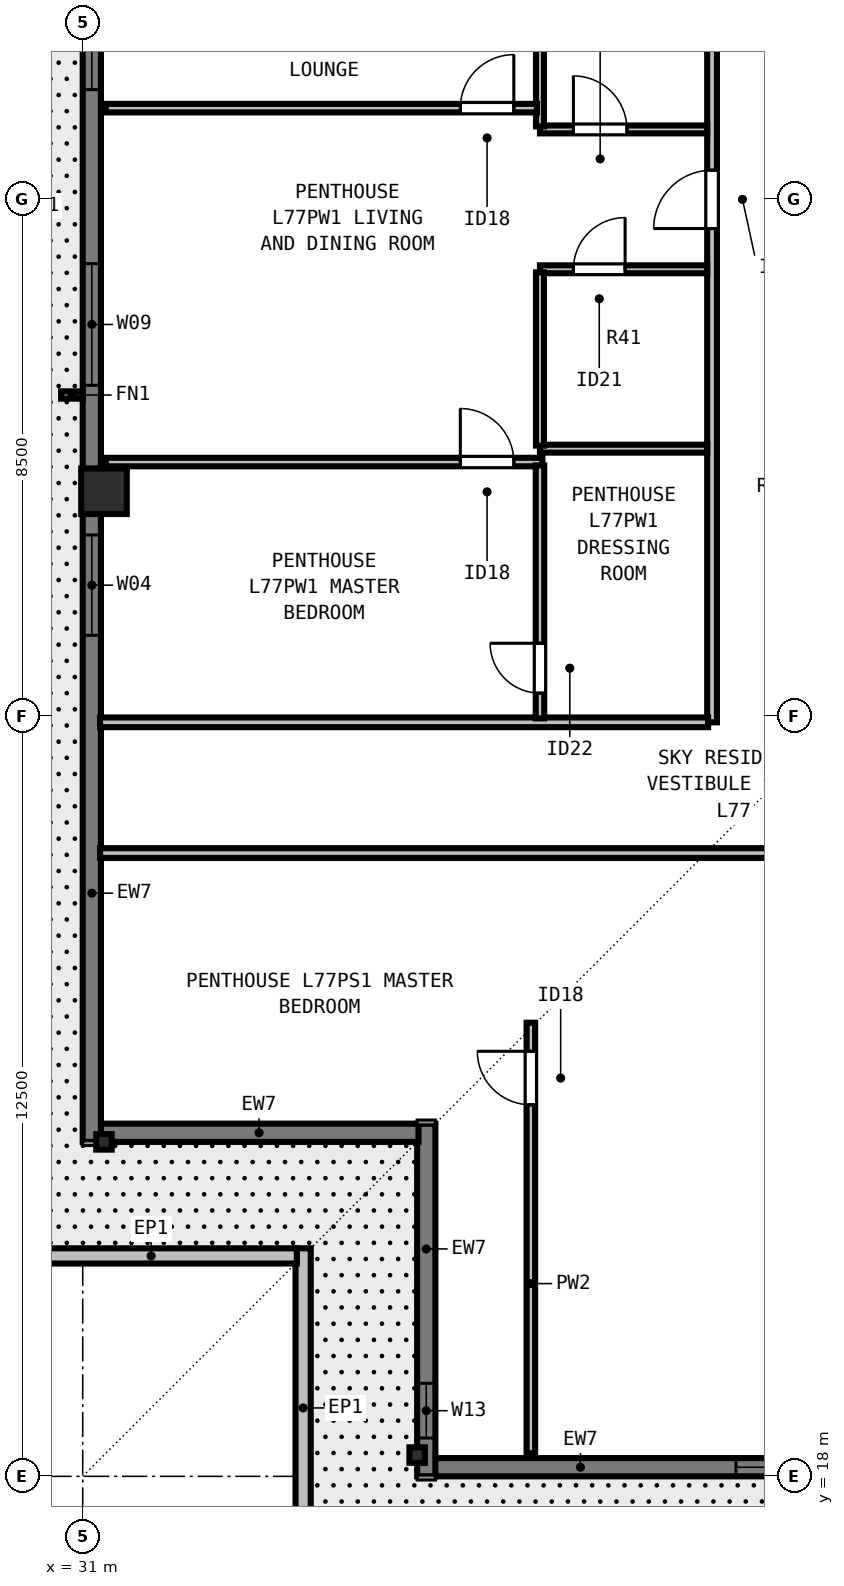
"""IFC4 building model, lengths in metres.
Left out: names, types, materials, properties, quantities, classifications, styles, units other than length and angle.
Written with IfcOpenShell. Run it as: python <this file> out.ifc"""

import sys

from ifc_helpers import new_model, si_unit, direction, frame, frame_2d, origin, origin_2d, place, context, subcontext, project, spatial, rectangle, i_section, extrude, element, fill, save


model = new_model("IFC4")
c1 = context("Model", 3, precision=1e-05, world=origin(), true_north=direction((0.0, 1.0)))
c2 = subcontext(c1, "Body", "Model", "MODEL_VIEW")
j1 = project(units=[si_unit("LENGTHUNIT", "METRE"), si_unit("PLANEANGLEUNIT", "RADIAN")], contexts=[c1])
p1 = place(None, origin())
s1 = spatial("IfcSite", under=j1, at=p1, CompositionType="ELEMENT")
p2 = place(p1, origin())
s2 = spatial("IfcBuilding", under=s1, at=p2, CompositionType="ELEMENT")
p3 = place(p2, frame((0.0, 0.0, 280.5)))
s3 = spatial("IfcBuildingStorey", under=s2, at=p3, CompositionType="ELEMENT", Elevation=280.5)
p4 = place(p3, frame((36.5, 18.35, 0.0), z_axis=(0.0, 0.0, 1.0), x_axis=(1.0, 0.0, 0.0)))
e1 = element("IfcColumn", 1, at=p4, inside=s3, PredefinedType="COLUMN", context=c2, shape_type="SweptSolid", body=[
    extrude(i_section(OverallWidth=0.254, OverallDepth=0.254, WebThickness=0.009, FlangeThickness=0.014, FilletRadius=0.013, at=origin_2d()), origin(), (0.0, 0.0, 1.0), 3.5),
])
p5 = place(p3, frame((31.35, 34.2, 0.0), z_axis=(0.0, 0.0, 1.0), x_axis=(0.0, 1.0, 0.0)))
e2 = element("IfcColumn", 2, at=p5, inside=s3, PredefinedType="COLUMN", context=c2, shape_type="SweptSolid", body=[
    extrude(rectangle(XDim=0.75, YDim=0.75, at=origin_2d()), origin(), (0.0, 0.0, 1.0), 3.5),
])
p6 = place(p3, frame((31.35, 23.5, 0.0), z_axis=(0.0, 0.0, 1.0), x_axis=(0.0, 1.0, 0.0)))
e3 = element("IfcColumn", 3, at=p6, inside=s3, PredefinedType="COLUMN", context=c2, shape_type="SweptSolid", body=[
    extrude(i_section(OverallWidth=0.254, OverallDepth=0.254, WebThickness=0.009, FlangeThickness=0.014, FilletRadius=0.013, at=origin_2d()), origin(), (0.0, 0.0, 1.0), 3.5),
])
p7 = place(p3, frame((34.625, 16.5, 0.0), z_axis=(0.0, 0.0, 1.0), x_axis=(0.0, 1.0, 0.0)))
e4 = element("IfcWall", 4, at=p7, inside=s3, PredefinedType="PARAPET", context=c2, shape_type="SweptSolid", body=[
    extrude(rectangle(XDim=5.25, YDim=0.25, at=frame_2d((2.625, 0.0))), origin(), (0.0, 0.0, 1.0), 1.15),
])
p8 = place(p3, frame((34.522, 21.625, 0.0), z_axis=(0.0, 0.0, 1.0), x_axis=(-1.0, 0.0, 0.0)))
e5 = element("IfcWall", 5, at=p8, inside=s3, PredefinedType="PARAPET", context=c2, shape_type="SweptSolid", body=[
    extrude(rectangle(XDim=4.794, YDim=0.25, at=frame_2d((2.397, 0.0))), origin(), (0.0, 0.0, 1.0), 1.15),
])
p9 = place(p3, frame((57.4, 18.15, 0.0), z_axis=(0.0, 0.0, 1.0), x_axis=(-1.0, 0.0, 0.0)))
e6 = element("IfcWall", 6, at=p9, inside=s3, PredefinedType="SOLIDWALL", context=c2, shape_type="SweptSolid", body=[
    extrude(rectangle(XDim=20.622, YDim=0.3, at=frame_2d((10.311, 0.0))), origin(), (0.0, 0.0, 1.0), 3.29),
])
p10 = place(p9, frame((1.34, 0.0, 0.8)))
e7 = element("IfcOpeningElement", 7, at=p10, cuts=e6, PredefinedType="OPENING", context=c2, shape_type="SweptSolid", body=[
    extrude(rectangle(XDim=2.0, YDim=1.758, at=frame_2d((1.0, 0.879))), frame((0.0, 0.16, 0.0), z_axis=(0.0, -1.0, 0.0), x_axis=(1.0, 0.0, 0.0)), (0.0, 0.0, 1.0), 0.32),
])
p11 = place(p9, frame((6.246, 0.0, 0.8)))
e8 = element("IfcOpeningElement", 8, at=p11, cuts=e6, PredefinedType="OPENING", context=c2, shape_type="SweptSolid", body=[
    extrude(rectangle(XDim=1.65, YDim=1.758, at=frame_2d((0.825, 0.879))), frame((0.0, 0.16, 0.0), z_axis=(0.0, -1.0, 0.0), x_axis=(1.0, 0.0, 0.0)), (0.0, 0.0, 1.0), 0.32),
])
p12 = place(p9, frame((10.801, 0.0, 0.8)))
e9 = element("IfcOpeningElement", 9, at=p12, cuts=e6, PredefinedType="OPENING", context=c2, shape_type="SweptSolid", body=[
    extrude(rectangle(XDim=2.0, YDim=1.758, at=frame_2d((1.0, 0.879))), frame((0.0, 0.16, 0.0), z_axis=(0.0, -1.0, 0.0), x_axis=(1.0, 0.0, 0.0)), (0.0, 0.0, 1.0), 0.32),
])
p13 = place(p9, frame((14.007, 0.0, 0.8)))
e10 = element("IfcOpeningElement", 10, at=p13, cuts=e6, PredefinedType="OPENING", context=c2, shape_type="SweptSolid", body=[
    extrude(rectangle(XDim=1.65, YDim=1.758, at=frame_2d((0.825, 0.879))), frame((0.0, 0.16, 0.0), z_axis=(0.0, -1.0, 0.0), x_axis=(1.0, 0.0, 0.0)), (0.0, 0.0, 1.0), 0.32),
])
p14 = place(p9, frame((4.7, 0.0, 0.0)))
e11 = element("IfcOpeningElement", 11, at=p14, cuts=e6, PredefinedType="OPENING", context=c2, shape_type="SweptSolid", body=[
    extrude(rectangle(XDim=1.15, YDim=2.15, at=frame_2d((0.575, 1.075))), frame((0.0, 0.16, 0.0), z_axis=(0.0, -1.0, 0.0), x_axis=(1.0, 0.0, 0.0)), (0.0, 0.0, 1.0), 0.32),
])
p15 = place(p3, frame((36.65, 18.0, 0.0), z_axis=(0.0, 0.0, 1.0), x_axis=(0.0, 1.0, 0.0)))
e12 = element("IfcWall", 12, at=p15, inside=s3, PredefinedType="SOLIDWALL", context=c2, shape_type="SweptSolid", body=[
    extrude(rectangle(XDim=5.8, YDim=0.3, at=frame_2d((2.9, 0.0))), origin(), (0.0, 0.0, 1.0), 3.29),
])
p16 = place(p15, frame((0.63, 0.0, 0.8)))
e13 = element("IfcOpeningElement", 13, at=p16, cuts=e12, PredefinedType="OPENING", context=c2, shape_type="SweptSolid", body=[
    extrude(rectangle(XDim=0.9, YDim=1.75, at=frame_2d((0.45, 0.875))), frame((0.0, 0.16, 0.0), z_axis=(0.0, -1.0, 0.0), x_axis=(1.0, 0.0, 0.0)), (0.0, 0.0, 1.0), 0.32),
])
p17 = place(p3, frame((36.522, 23.65, 0.0), z_axis=(0.0, 0.0, 1.0), x_axis=(-1.0, 0.0, 0.0)))
e14 = element("IfcWall", 14, at=p17, inside=s3, PredefinedType="SOLIDWALL", context=c2, shape_type="SweptSolid", body=[
    extrude(rectangle(XDim=5.244, YDim=0.3, at=frame_2d((2.622, 0.0))), origin(), (0.0, 0.0, 1.0), 3.29),
])
p18 = place(p3, frame((31.15, 23.5, 0.0), z_axis=(0.0, 0.0, 1.0), x_axis=(0.0, 1.0, 0.0)))
e15 = element("IfcWall", 15, at=p18, inside=s3, PredefinedType="SOLIDWALL", context=c2, shape_type="SweptSolid", body=[
    extrude(rectangle(XDim=30.722, YDim=0.3, at=frame_2d((15.361, 0.0))), origin(), (0.0, 0.0, 1.0), 3.29),
])
p19 = place(p18, frame((8.331, 0.0, 0.8)))
e16 = element("IfcOpeningElement", 16, at=p19, cuts=e15, PredefinedType="OPENING", context=c2, shape_type="SweptSolid", body=[
    extrude(rectangle(XDim=1.65, YDim=1.758, at=frame_2d((0.825, 0.879))), frame((0.0, 0.16, 0.0), z_axis=(0.0, -1.0, 0.0), x_axis=(1.0, 0.0, 0.0)), (0.0, 0.0, 1.0), 0.32),
])
p20 = place(p18, frame((12.442, 0.0, 0.8)))
e17 = element("IfcOpeningElement", 17, at=p20, cuts=e15, PredefinedType="OPENING", context=c2, shape_type="SweptSolid", body=[
    extrude(rectangle(XDim=2.0, YDim=1.758, at=frame_2d((1.0, 0.879))), frame((0.0, 0.16, 0.0), z_axis=(0.0, -1.0, 0.0), x_axis=(1.0, 0.0, 0.0)), (0.0, 0.0, 1.0), 0.32),
])
p21 = place(p18, frame((17.304, 0.0, 0.8)))
e18 = element("IfcOpeningElement", 18, at=p21, cuts=e15, PredefinedType="OPENING", context=c2, shape_type="SweptSolid", body=[
    extrude(rectangle(XDim=1.65, YDim=1.758, at=frame_2d((0.825, 0.879))), frame((0.0, 0.16, 0.0), z_axis=(0.0, -1.0, 0.0), x_axis=(1.0, 0.0, 0.0)), (0.0, 0.0, 1.0), 0.32),
])
p22 = place(p18, frame((20.967, 0.0, 0.8)))
e19 = element("IfcOpeningElement", 19, at=p22, cuts=e15, PredefinedType="OPENING", context=c2, shape_type="SweptSolid", body=[
    extrude(rectangle(XDim=2.0, YDim=1.758, at=frame_2d((1.0, 0.879))), frame((0.0, 0.16, 0.0), z_axis=(0.0, -1.0, 0.0), x_axis=(1.0, 0.0, 0.0)), (0.0, 0.0, 1.0), 0.32),
])
p23 = place(p18, frame((26.63, 0.0, 0.8)))
e20 = element("IfcOpeningElement", 20, at=p23, cuts=e15, PredefinedType="OPENING", context=c2, shape_type="SweptSolid", body=[
    extrude(rectangle(XDim=0.9, YDim=1.75, at=frame_2d((0.45, 0.875))), frame((0.0, 0.16, 0.0), z_axis=(0.0, -1.0, 0.0), x_axis=(1.0, 0.0, 0.0)), (0.0, 0.0, 1.0), 0.32),
])
p24 = place(p3, frame((31.285, 28.25, 0.0), z_axis=(0.0, 0.0, 1.0), x_axis=(1.0, 0.0, 0.0)))
e21 = element("IfcWall", 21, at=p24, inside=s3, PredefinedType="PARTITIONING", context=c2, shape_type="SweptSolid", body=[
    extrude(rectangle(XDim=41.43, YDim=0.16, at=frame_2d((20.715, 0.0))), origin(), (0.0, 0.0, 1.0), 3.009),
])
p25 = place(p24, frame((20.235, 0.0, 0.0)))
e22 = element("IfcOpeningElement", 22, at=p25, cuts=e21, PredefinedType="OPENING", context=c2, shape_type="SweptSolid", body=[
    extrude(rectangle(XDim=0.96, YDim=2.18, at=frame_2d((0.48, 1.09))), frame((0.0, 0.09, 0.0), z_axis=(0.0, -1.0, 0.0), x_axis=(1.0, 0.0, 0.0)), (0.0, 0.0, 1.0), 0.18),
])
p26 = place(p3, frame((41.35, 30.4, 0.0), z_axis=(0.0, 0.0, 1.0), x_axis=(0.0, 1.0, 0.0)))
e23 = element("IfcWall", 23, at=p26, inside=s3, PredefinedType="PARTITIONING", context=c2, shape_type="SweptSolid", body=[
    extrude(rectangle(XDim=17.2, YDim=0.16, at=frame_2d((8.6, 0.0))), origin(), (0.0, 0.0, 1.0), 3.009),
])
p27 = place(p26, frame((8.12, 0.0, 0.0)))
e24 = element("IfcOpeningElement", 24, at=p27, cuts=e23, PredefinedType="OPENING", context=c2, shape_type="SweptSolid", body=[
    extrude(rectangle(XDim=0.96, YDim=2.18, at=frame_2d((0.48, 1.09))), frame((0.0, 0.09, 0.0), z_axis=(0.0, -1.0, 0.0), x_axis=(1.0, 0.0, 0.0)), (0.0, 0.0, 1.0), 0.18),
])
p28 = place(p3, frame((31.285, 30.4, 0.0), z_axis=(0.0, 0.0, 1.0), x_axis=(1.0, 0.0, 0.0)))
e25 = element("IfcWall", 25, at=p28, inside=s3, PredefinedType="PARTITIONING", context=c2, shape_type="SweptSolid", body=[
    extrude(rectangle(XDim=10.0, YDim=0.16, at=frame_2d((5.0, 0.0))), origin(), (0.0, 0.0, 1.0), 3.29),
])
p29 = place(p3, frame((38.37, 18.38, 0.0), z_axis=(0.0, 0.0, 1.0), x_axis=(0.0, 1.0, 0.0)))
e26 = element("IfcWall", 26, at=p29, inside=s3, PredefinedType="PARTITIONING", context=c2, shape_type="SweptSolid", body=[
    extrude(rectangle(XDim=7.08, YDim=0.14, at=frame_2d((3.54, 0.0))), origin(), (0.0, 0.0, 1.0), 2.653),
])
p30 = place(p29, frame((5.73, 0.0, 0.0)))
e27 = element("IfcOpeningElement", 27, at=p30, cuts=e26, PredefinedType="OPENING", context=c2, shape_type="SweptSolid", body=[
    extrude(rectangle(XDim=0.88, YDim=2.1, at=frame_2d((0.44, 1.05))), frame((0.0, 0.08, 0.0), z_axis=(0.0, -1.0, 0.0), x_axis=(1.0, 0.0, 0.0)), (0.0, 0.0, 1.0), 0.16),
])
p31 = place(p3, frame((38.52, 34.9, 0.0), z_axis=(0.0, 0.0, 1.0), x_axis=(1.0, 0.0, 0.0)))
e28 = element("IfcWall", 28, at=p31, inside=s3, PredefinedType="PLUMBINGWALL", context=c2, shape_type="SweptSolid", body=[
    extrude(rectangle(XDim=2.75, YDim=0.13, at=frame_2d((1.375, 0.0))), origin(), (0.0, 0.0, 1.0), 3.29),
])
p32 = place(p3, frame((38.52, 37.85, 0.0), z_axis=(0.0, 0.0, 1.0), x_axis=(1.0, 0.0, 0.0)))
e29 = element("IfcWall", 29, at=p32, inside=s3, PredefinedType="PLUMBINGWALL", context=c2, shape_type="SweptSolid", body=[
    extrude(rectangle(XDim=2.75, YDim=0.13, at=frame_2d((1.375, 0.0))), origin(), (0.0, 0.0, 1.0), 3.29),
])
p33 = place(p32, frame((0.55, 0.0, 0.0)))
e30 = element("IfcOpeningElement", 30, at=p33, cuts=e29, PredefinedType="OPENING", context=c2, shape_type="SweptSolid", body=[
    extrude(rectangle(XDim=0.85, YDim=2.08, at=frame_2d((0.425, 1.04))), frame((0.0, 0.075, 0.0), z_axis=(0.0, -1.0, 0.0), x_axis=(1.0, 0.0, 0.0)), (0.0, 0.0, 1.0), 0.15),
])
p34 = place(p3, frame((38.52, 34.95, 0.0), z_axis=(0.0, 0.0, 1.0), x_axis=(0.0, 1.0, 0.0)))
e31 = element("IfcWall", 31, at=p34, inside=s3, PredefinedType="PLUMBINGWALL", context=c2, shape_type="SweptSolid", body=[
    extrude(rectangle(XDim=2.85, YDim=0.13, at=frame_2d((1.425, 0.0))), origin(), (0.0, 0.0, 1.0), 3.29),
])
p35 = place(p3, frame((38.52, 40.15, 0.0), z_axis=(0.0, 0.0, 1.0), x_axis=(1.0, 0.0, 0.0)))
e32 = element("IfcWall", 32, at=p35, inside=s3, PredefinedType="PLUMBINGWALL", context=c2, shape_type="SweptSolid", body=[
    extrude(rectangle(XDim=2.75, YDim=0.13, at=frame_2d((1.375, 0.0))), origin(), (0.0, 0.0, 1.0), 3.29),
])
p36 = place(p35, frame((0.55, 0.0, 0.0)))
e33 = element("IfcOpeningElement", 33, at=p36, cuts=e32, PredefinedType="OPENING", context=c2, shape_type="SweptSolid", body=[
    extrude(rectangle(XDim=0.88, YDim=2.1, at=frame_2d((0.44, 1.05))), frame((0.0, 0.075, 0.0), z_axis=(0.0, -1.0, 0.0), x_axis=(1.0, 0.0, 0.0)), (0.0, 0.0, 1.0), 0.15),
])
p37 = place(p3, frame((38.52, 40.2, 0.0), z_axis=(0.0, 0.0, 1.0), x_axis=(0.0, 1.0, 0.0)))
e34 = element("IfcWall", 34, at=p37, inside=s3, PredefinedType="PLUMBINGWALL", context=c2, shape_type="SweptSolid", body=[
    extrude(rectangle(XDim=3.15, YDim=0.13, at=frame_2d((1.575, 0.0))), origin(), (0.0, 0.0, 1.0), 3.009),
])
p38 = place(p3, frame((31.38, 34.68, 0.0), z_axis=(0.0, 0.0, 1.0), x_axis=(1.0, 0.0, 0.0)))
e35 = element("IfcWall", 35, at=p38, inside=s3, PredefinedType="PARTITIONING", context=c2, shape_type="SweptSolid", body=[
    extrude(rectangle(XDim=7.18, YDim=0.14, at=frame_2d((3.59, 0.0))), origin(), (0.0, 0.0, 1.0), 3.29),
])
p39 = place(p38, frame((5.83, 0.0, 0.0)))
e36 = element("IfcOpeningElement", 36, at=p39, cuts=e35, PredefinedType="OPENING", context=c2, shape_type="SweptSolid", body=[
    extrude(rectangle(XDim=0.88, YDim=2.1, at=frame_2d((0.44, 1.05))), frame((0.0, 0.08, 0.0), z_axis=(0.0, -1.0, 0.0), x_axis=(1.0, 0.0, 0.0)), (0.0, 0.0, 1.0), 0.16),
])
p40 = place(p3, frame((38.52, 30.465, 0.0), z_axis=(0.0, 0.0, 1.0), x_axis=(0.0, 1.0, 0.0)))
e37 = element("IfcWall", 37, at=p40, inside=s3, PredefinedType="PARTITIONING", context=c2, shape_type="SweptSolid", body=[
    extrude(rectangle(XDim=4.16, YDim=0.14, at=frame_2d((2.08, 0.0))), origin(), (0.0, 0.0, 1.0), 3.29),
])
p41 = place(p40, frame((0.415, 0.0, 0.0)))
e38 = element("IfcOpeningElement", 38, at=p41, cuts=e37, PredefinedType="OPENING", context=c2, shape_type="SweptSolid", body=[
    extrude(rectangle(XDim=0.82, YDim=2.1, at=frame_2d((0.41, 1.05))), frame((0.0, 0.08, 0.0), z_axis=(0.0, -1.0, 0.0), x_axis=(1.0, 0.0, 0.0)), (0.0, 0.0, 1.0), 0.16),
])
p42 = place(p3, frame((31.38, 40.5, 0.0), z_axis=(0.0, 0.0, 1.0), x_axis=(1.0, 0.0, 0.0)))
e39 = element("IfcWall", 39, at=p42, inside=s3, PredefinedType="PARTITIONING", context=c2, shape_type="SweptSolid", body=[
    extrude(rectangle(XDim=7.09, YDim=0.14, at=frame_2d((3.545, 0.0))), origin(), (0.0, 0.0, 1.0), 3.29),
])
p43 = place(p42, frame((5.83, 0.0, 0.0)))
e40 = element("IfcOpeningElement", 40, at=p43, cuts=e39, PredefinedType="OPENING", context=c2, shape_type="SweptSolid", body=[
    extrude(rectangle(XDim=0.88, YDim=2.1, at=frame_2d((0.44, 1.05))), frame((0.0, 0.08, 0.0), z_axis=(0.0, -1.0, 0.0), x_axis=(1.0, 0.0, 0.0)), (0.0, 0.0, 1.0), 0.16),
])
p44 = place(p13, origin())
e41 = element("IfcWindow", 41, at=p44, inside=s3, PartitioningType="SINGLE_PANEL", PredefinedType="WINDOW", context=c2, shape_type="SweptSolid", body=[
    extrude(rectangle(XDim=1.65, YDim=1.758, at=frame_2d((0.825, 0.879))), frame((0.0, -0.05, 0.0), z_axis=(0.0, -1.0, 0.0), x_axis=(1.0, 0.0, 0.0)), (0.0, 0.0, 1.0), 0.06),
])
fill(e10, e41)
p45 = place(p19, origin())
e42 = element("IfcWindow", 42, at=p45, inside=s3, PartitioningType="SINGLE_PANEL", PredefinedType="WINDOW", context=c2, shape_type="SweptSolid", body=[
    extrude(rectangle(XDim=1.65, YDim=1.758, at=frame_2d((0.825, 0.879))), frame((0.0, -0.05, 0.0), z_axis=(0.0, -1.0, 0.0), x_axis=(1.0, 0.0, 0.0)), (0.0, 0.0, 1.0), 0.06),
])
fill(e16, e42)
p46 = place(p20, origin())
e43 = element("IfcWindow", 43, at=p46, inside=s3, PartitioningType="SINGLE_PANEL", PredefinedType="WINDOW", context=c2, shape_type="SweptSolid", body=[
    extrude(rectangle(XDim=2.0, YDim=1.758, at=frame_2d((1.0, 0.879))), frame((0.0, -0.05, 0.0), z_axis=(0.0, -1.0, 0.0), x_axis=(1.0, 0.0, 0.0)), (0.0, 0.0, 1.0), 0.06),
])
fill(e17, e43)
p47 = place(p21, origin())
e44 = element("IfcWindow", 44, at=p47, inside=s3, PartitioningType="SINGLE_PANEL", PredefinedType="WINDOW", context=c2, shape_type="SweptSolid", body=[
    extrude(rectangle(XDim=1.65, YDim=1.758, at=frame_2d((0.825, 0.879))), frame((0.0, -0.05, 0.0), z_axis=(0.0, -1.0, 0.0), x_axis=(1.0, 0.0, 0.0)), (0.0, 0.0, 1.0), 0.06),
])
fill(e18, e44)
p48 = place(p16, origin())
e45 = element("IfcWindow", 45, at=p48, inside=s3, PartitioningType="SINGLE_PANEL", PredefinedType="WINDOW", context=c2, shape_type="SweptSolid", body=[
    extrude(rectangle(XDim=0.9, YDim=1.75, at=frame_2d((0.45, 0.875))), frame((0.0, -0.04, 0.0), z_axis=(0.0, -1.0, 0.0), x_axis=(1.0, 0.0, 0.0)), (0.0, 0.0, 1.0), 0.06),
])
fill(e13, e45)
p49 = place(p30, origin())
e46 = element("IfcDoor", 46, at=p49, inside=s3, OperationType="SINGLE_SWING_RIGHT", PredefinedType="DOOR", context=c2, shape_type="SweptSolid", body=[
    extrude(rectangle(XDim=0.88, YDim=2.1, at=frame_2d((0.44, 1.05))), frame((0.0, 0.025, 0.0), z_axis=(0.0, -1.0, 0.0), x_axis=(1.0, 0.0, 0.0)), (0.0, 0.0, 1.0), 0.05),
])
fill(e27, e46)
p50 = place(p33, origin())
e47 = element("IfcDoor", 47, at=p50, inside=s3, OperationType="SINGLE_SWING_RIGHT", PredefinedType="DOOR", context=c2, shape_type="SweptSolid", body=[
    extrude(rectangle(XDim=0.85, YDim=2.08, at=frame_2d((0.425, 1.04))), frame((0.0, 0.025, 0.0), z_axis=(0.0, -1.0, 0.0), x_axis=(1.0, 0.0, 0.0)), (0.0, 0.0, 1.0), 0.05),
])
fill(e30, e47)
p51 = place(p36, origin())
e48 = element("IfcDoor", 48, at=p51, inside=s3, OperationType="SINGLE_SWING_LEFT", PredefinedType="DOOR", context=c2, shape_type="SweptSolid", body=[
    extrude(rectangle(XDim=0.88, YDim=2.1, at=frame_2d((0.44, 1.05))), frame((0.0, 0.025, 0.0), z_axis=(0.0, -1.0, 0.0), x_axis=(1.0, 0.0, 0.0)), (0.0, 0.0, 1.0), 0.05),
])
fill(e33, e48)
p52 = place(p41, origin())
e49 = element("IfcDoor", 49, at=p52, inside=s3, OperationType="SINGLE_SWING_RIGHT", PredefinedType="DOOR", context=c2, shape_type="SweptSolid", body=[
    extrude(rectangle(XDim=0.82, YDim=2.1, at=frame_2d((0.41, 1.05))), frame((0.0, 0.025, 0.0), z_axis=(0.0, -1.0, 0.0), x_axis=(1.0, 0.0, 0.0)), (0.0, 0.0, 1.0), 0.05),
])
fill(e38, e49)
p53 = place(p39, origin())
e50 = element("IfcDoor", 50, at=p53, inside=s3, OperationType="SINGLE_SWING_LEFT", PredefinedType="DOOR", context=c2, shape_type="SweptSolid", body=[
    extrude(rectangle(XDim=0.88, YDim=2.1, at=frame_2d((0.44, 1.05))), frame((0.0, 0.025, 0.0), z_axis=(0.0, -1.0, 0.0), x_axis=(1.0, 0.0, 0.0)), (0.0, 0.0, 1.0), 0.05),
])
fill(e36, e50)
p54 = place(p43, origin())
e51 = element("IfcDoor", 51, at=p54, inside=s3, OperationType="SINGLE_SWING_RIGHT", PredefinedType="DOOR", context=c2, shape_type="SweptSolid", body=[
    extrude(rectangle(XDim=0.88, YDim=2.1, at=frame_2d((0.44, 1.05))), frame((0.0, 0.025, 0.0), z_axis=(0.0, -1.0, 0.0), x_axis=(1.0, 0.0, 0.0)), (0.0, 0.0, 1.0), 0.05),
])
fill(e40, e51)
p55 = place(p27, origin())
e52 = element("IfcDoor", 52, at=p55, inside=s3, OperationType="SINGLE_SWING_LEFT", PredefinedType="DOOR", context=c2, shape_type="SweptSolid", body=[
    extrude(rectangle(XDim=0.96, YDim=2.18, at=frame_2d((0.48, 1.09))), frame((0.0, 0.025, 0.0), z_axis=(0.0, -1.0, 0.0), x_axis=(1.0, 0.0, 0.0)), (0.0, 0.0, 1.0), 0.05),
])
fill(e24, e52)
save(model, sys.argv[1])
